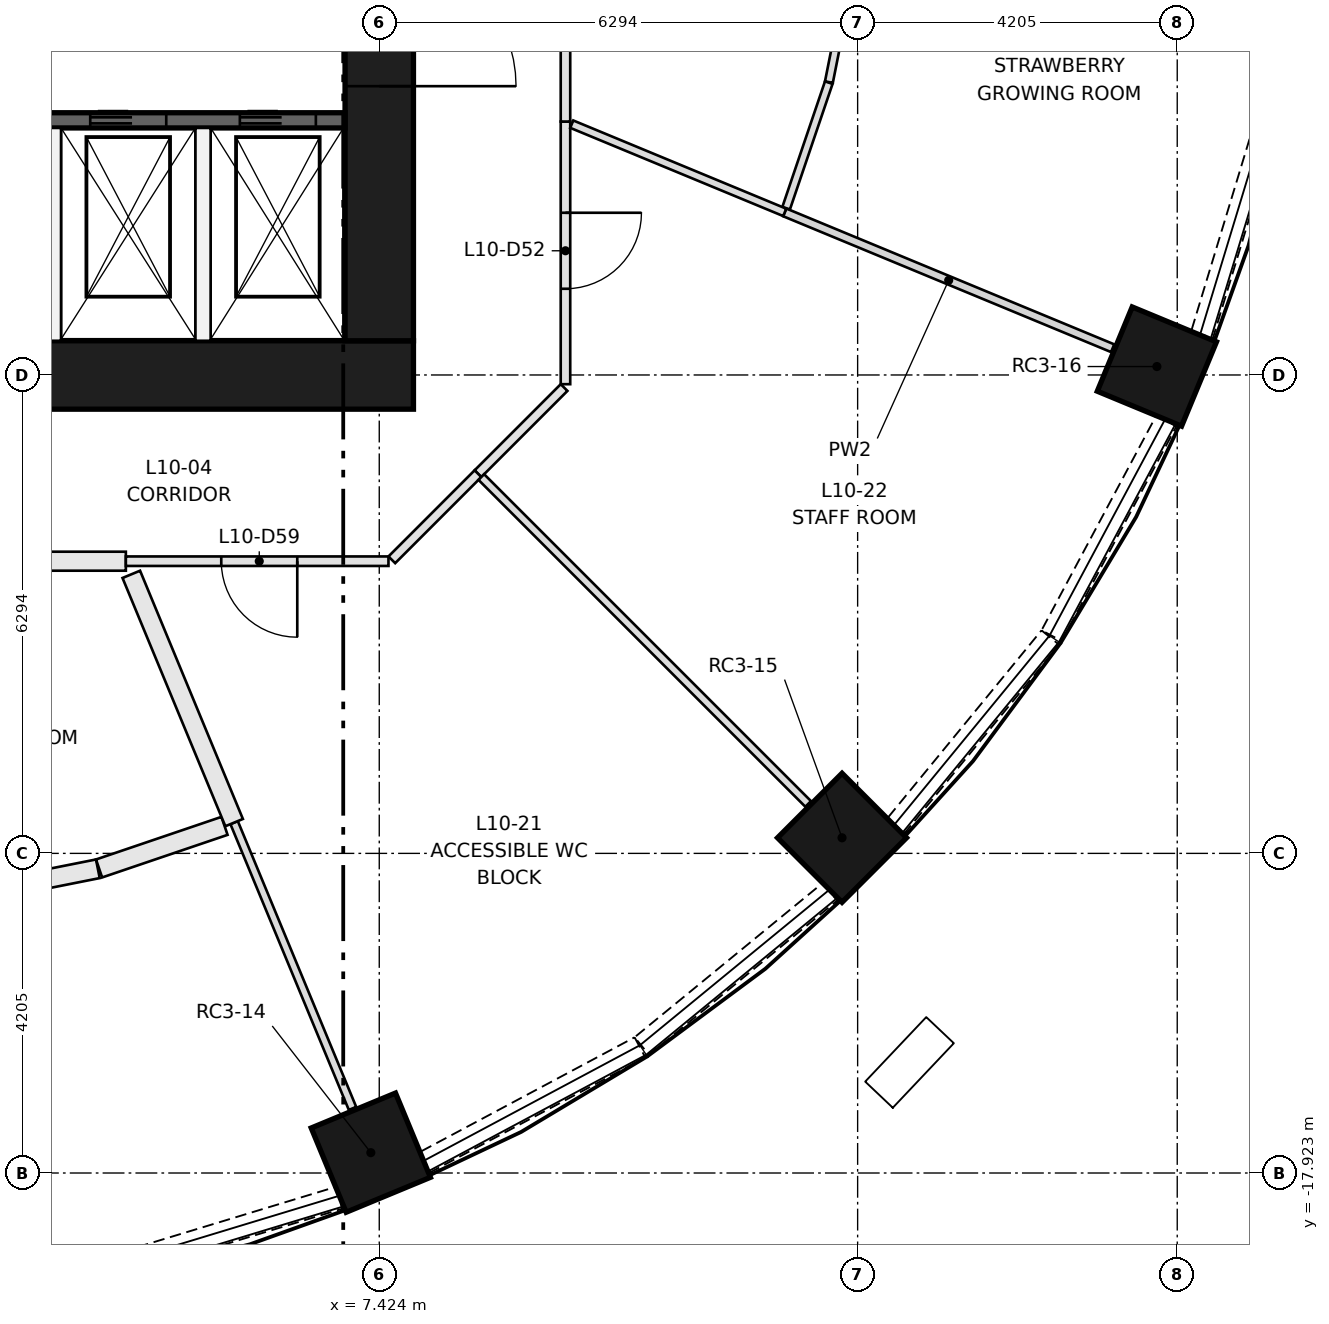
"""IFC4 building model, lengths in metres.
Left out: names, types, materials, properties, quantities, classifications, styles, units other than length and angle.
Written with IfcOpenShell. Run it as: python <this file> out.ifc"""

import sys

from ifc_helpers import new_model, si_unit, direction, frame, frame_2d, origin, origin_2d, place, context, subcontext, project, spatial, rectangle, extrude, element, fill, save


model = new_model("IFC4")
c1 = context("Model", 3, precision=1e-05, world=origin(), true_north=direction((0.0, 1.0)))
c2 = subcontext(c1, "Body", "Model", "MODEL_VIEW")
j1 = project(units=[si_unit("LENGTHUNIT", "METRE"), si_unit("PLANEANGLEUNIT", "RADIAN")], contexts=[c1])
p1 = place(None, origin())
s1 = spatial("IfcSite", under=j1, at=p1, CompositionType="ELEMENT")
p2 = place(p1, origin())
s2 = spatial("IfcBuilding", under=s1, at=p2, CompositionType="ELEMENT")
p3 = place(p2, frame((0.0, 0.0, 40.8)))
s3 = spatial("IfcBuildingStorey", under=s2, at=p3, CompositionType="ELEMENT", Elevation=40.8)
for number, where, z_axis, x_axis in (
    (1, (7.313, -17.655, 0.0), (0.0, 0.0, 1.0), (0.383, -0.924, 0.0)),
    (2, (13.513, -13.513, 0.0), (0.0, 0.0, 1.0), (0.707, -0.707, 0.0)),
    (3, (17.655, -7.313, 0.0), (0.0, 0.0, 1.0), (0.924, -0.383, 0.0)),
):
    element("IfcColumn", number, at=place(p3, frame(where, z_axis=z_axis, x_axis=x_axis)), inside=s3, PredefinedType="COLUMN", context=c2, shape_type="SweptSolid", body=[
        extrude(rectangle(XDim=1.2, YDim=1.2, at=origin_2d()), origin(), (0.0, 0.0, 1.0), 3.65),
    ])
p4 = place(p3, frame((-7.874, -7.424, 0.0), z_axis=(0.0, 0.0, 1.0), x_axis=(1.0, 0.0, 0.0)))
e4 = element("IfcWall", 4, at=p4, inside=s3, PredefinedType="SHEAR", context=c2, shape_type="SweptSolid", body=[
    extrude(rectangle(XDim=15.748, YDim=0.9, at=frame_2d((7.874, 0.0))), origin(), (0.0, 0.0, 1.0), 3.65),
])
p5 = place(p3, frame((7.424, -6.974, 0.0), z_axis=(0.0, 0.0, 1.0), x_axis=(0.0, 1.0, 0.0)))
e5 = element("IfcWall", 5, at=p5, inside=s3, PredefinedType="SHEAR", context=c2, shape_type="SweptSolid", body=[
    extrude(rectangle(XDim=13.948, YDim=0.9, at=frame_2d((6.974, 0.0))), origin(), (0.0, 0.0, 1.0), 3.65),
])
p6 = place(p5, frame((6.474, 0.0, 0.0)))
e6 = element("IfcOpeningElement", 6, at=p6, cuts=e5, PredefinedType="OPENING", context=c2, shape_type="SweptSolid", body=[
    extrude(rectangle(XDim=1.0, YDim=2.1, at=frame_2d((0.5, 1.05))), frame((0.0, 0.46, 0.0), z_axis=(0.0, -1.0, 0.0), x_axis=(1.0, 0.0, 0.0)), (0.0, 0.0, 1.0), 0.92),
])
p7 = place(p5, frame((3.35, 0.0, 0.0)))
e7 = element("IfcOpeningElement", 7, at=p7, cuts=e5, PredefinedType="OPENING", context=c2, shape_type="SweptSolid", body=[
    extrude(rectangle(XDim=1.8, YDim=2.1, at=frame_2d((0.9, 1.05))), frame((0.0, 0.46, 0.0), z_axis=(0.0, -1.0, 0.0), x_axis=(1.0, 0.0, 0.0)), (0.0, 0.0, 1.0), 0.92),
])
p8 = place(p5, frame((8.799, 0.0, 0.0)))
e8 = element("IfcOpeningElement", 8, at=p8, cuts=e5, PredefinedType="OPENING", context=c2, shape_type="SweptSolid", body=[
    extrude(rectangle(XDim=1.8, YDim=2.1, at=frame_2d((0.9, 1.05))), frame((0.0, 0.46, 0.0), z_axis=(0.0, -1.0, 0.0), x_axis=(1.0, 0.0, 0.0)), (0.0, 0.0, 1.0), 0.92),
])
p9 = place(p3, frame((-6.974, -4.074, 0.0), z_axis=(0.0, 0.0, 1.0), x_axis=(1.0, 0.0, 0.0)))
e9 = element("IfcWall", 9, at=p9, inside=s3, PredefinedType="SHEAR", context=c2, shape_type="SweptSolid", body=[
    extrude(rectangle(XDim=13.948, YDim=0.2, at=frame_2d((6.974, 0.0))), origin(), (0.0, 0.0, 1.0), 3.3),
])
p10 = place(p9, frame((0.918, 0.0, 0.0)))
e10 = element("IfcOpeningElement", 10, at=p10, cuts=e9, PredefinedType="OPENING", context=c2, shape_type="SweptSolid", body=[
    extrude(rectangle(XDim=1.1, YDim=2.1, at=frame_2d((0.55, 1.05))), frame((0.0, 0.11, 0.0), z_axis=(0.0, -1.0, 0.0), x_axis=(1.0, 0.0, 0.0)), (0.0, 0.0, 1.0), 0.22),
])
p11 = place(p9, frame((4.055, 0.0, 0.0)))
e11 = element("IfcOpeningElement", 11, at=p11, cuts=e9, PredefinedType="OPENING", context=c2, shape_type="SweptSolid", body=[
    extrude(rectangle(XDim=1.1, YDim=2.1, at=frame_2d((0.55, 1.05))), frame((0.0, 0.11, 0.0), z_axis=(0.0, -1.0, 0.0), x_axis=(1.0, 0.0, 0.0)), (0.0, 0.0, 1.0), 0.22),
])
p12 = place(p9, frame((6.658, 0.0, 0.0)))
e12 = element("IfcOpeningElement", 12, at=p12, cuts=e9, PredefinedType="OPENING", context=c2, shape_type="SweptSolid", body=[
    extrude(rectangle(XDim=1.0, YDim=2.1, at=frame_2d((0.5, 1.05))), frame((0.0, 0.11, 0.0), z_axis=(0.0, -1.0, 0.0), x_axis=(1.0, 0.0, 0.0)), (0.0, 0.0, 1.0), 0.22),
])
p13 = place(p9, frame((8.627, 0.0, 0.0)))
e13 = element("IfcOpeningElement", 13, at=p13, cuts=e9, PredefinedType="OPENING", context=c2, shape_type="SweptSolid", body=[
    extrude(rectangle(XDim=1.0, YDim=2.1, at=frame_2d((0.5, 1.05))), frame((0.0, 0.11, 0.0), z_axis=(0.0, -1.0, 0.0), x_axis=(1.0, 0.0, 0.0)), (0.0, 0.0, 1.0), 0.22),
])
p14 = place(p9, frame((10.595, 0.0, 0.0)))
e14 = element("IfcOpeningElement", 14, at=p14, cuts=e9, PredefinedType="OPENING", context=c2, shape_type="SweptSolid", body=[
    extrude(rectangle(XDim=1.0, YDim=2.1, at=frame_2d((0.5, 1.05))), frame((0.0, 0.11, 0.0), z_axis=(0.0, -1.0, 0.0), x_axis=(1.0, 0.0, 0.0)), (0.0, 0.0, 1.0), 0.22),
])
p15 = place(p9, frame((12.564, 0.0, 0.0)))
e15 = element("IfcOpeningElement", 15, at=p15, cuts=e9, PredefinedType="OPENING", context=c2, shape_type="SweptSolid", body=[
    extrude(rectangle(XDim=1.0, YDim=2.1, at=frame_2d((0.5, 1.05))), frame((0.0, 0.11, 0.0), z_axis=(0.0, -1.0, 0.0), x_axis=(1.0, 0.0, 0.0)), (0.0, 0.0, 1.0), 0.22),
])
for number, where, z_axis, x_axis in (
    (16, (3.137, -6.974, 0.0), (0.0, 0.0, 1.0), (0.0, 1.0, 0.0)),
    (17, (5.105, -6.974, 0.0), (0.0, 0.0, 1.0), (0.0, 1.0, 0.0)),
):
    element("IfcWall", number, at=place(p3, frame(where, z_axis=z_axis, x_axis=x_axis)), inside=s3, PredefinedType="PARTITIONING", context=c2, shape_type="SweptSolid", body=[
        extrude(rectangle(XDim=2.8, YDim=0.2, at=frame_2d((1.4, 0.0))), origin(), (0.0, 0.0, 1.0), 3.3),
    ])
p16 = place(p3, frame((3.83, -19.18, 0.0), z_axis=(0.0, 0.0, 1.0), x_axis=(0.956883225512, 0.290472877795, 0.0)))
e18 = element("IfcWall", 18, at=p16, inside=s3, PredefinedType="SOLIDWALL", context=c2, shape_type="SweptSolid", body=[
    extrude(rectangle(XDim=3.202, YDim=0.3, at=frame_2d((1.601, 0.0))), origin(), (0.0, 0.0, 1.0), 0.9),
])
p17 = place(p3, frame((8.028, -17.78, 0.0), z_axis=(0.0, 0.0, 1.0), x_axis=(0.881981372243, 0.471284265614, 0.0)))
e19 = element("IfcWall", 19, at=p17, inside=s3, PredefinedType="SOLIDWALL", context=c2, shape_type="SweptSolid", body=[
    extrude(rectangle(XDim=3.204, YDim=0.3, at=frame_2d((1.602, 0.0))), origin(), (0.0, 0.0, 1.0), 0.9),
])
for number, where, z_axis, x_axis in (
    (20, (10.879, -16.253, 0.0), (0.0, 0.0, 1.0), (0.773, 0.634, 0.0)),
    (21, (14.222, -13.354, 0.0), (0.0, 0.0, 1.0), (0.634, 0.773, 0.0)),
):
    element("IfcWall", number, at=place(p3, frame(where, z_axis=z_axis, x_axis=x_axis)), inside=s3, PredefinedType="SOLIDWALL", context=c2, shape_type="SweptSolid", body=[
        extrude(rectangle(XDim=3.202, YDim=0.3, at=frame_2d((1.601, 0.0))), origin(), (0.0, 0.0, 1.0), 0.9),
    ])
p18 = place(p3, frame((16.27, -10.854, 0.0), z_axis=(0.0, 0.0, 1.0), x_axis=(0.471284265614, 0.881981372243, 0.0)))
e22 = element("IfcWall", 22, at=p18, inside=s3, PredefinedType="SOLIDWALL", context=c2, shape_type="SweptSolid", body=[
    extrude(rectangle(XDim=3.204, YDim=0.3, at=frame_2d((1.602, 0.0))), origin(), (0.0, 0.0, 1.0), 0.9),
])
p19 = place(p3, frame((18.25, -6.895, 0.0), z_axis=(0.0, 0.0, 1.0), x_axis=(0.290472877795, 0.956883225512, 0.0)))
e23 = element("IfcWall", 23, at=p19, inside=s3, PredefinedType="SOLIDWALL", context=c2, shape_type="SweptSolid", body=[
    extrude(rectangle(XDim=3.202, YDim=0.3, at=frame_2d((1.601, 0.0))), origin(), (0.0, 0.0, 1.0), 0.9),
])
p20 = place(p3, frame((9.856, -7.589, 0.0), z_axis=(0.0, 0.0, 1.0), x_axis=(-0.70718294931, -0.707030604857, 0.0)))
e24 = element("IfcWall", 24, at=p20, inside=s3, PredefinedType="PARTITIONING", context=c2, shape_type="SweptSolid", body=[
    extrude(rectangle(XDim=1.603, YDim=0.125, at=frame_2d((0.801, 0.0))), origin(), (0.0, 0.0, 1.0), 3.3),
])
p21 = place(p3, frame((9.874, -4.09, 0.0), z_axis=(0.0, 0.0, 1.0), x_axis=(0.0, -1.0, 0.0)))
e25 = element("IfcWall", 25, at=p21, inside=s3, PredefinedType="PARTITIONING", context=c2, shape_type="SweptSolid", body=[
    extrude(rectangle(XDim=3.455, YDim=0.125, at=frame_2d((1.728, 0.0))), origin(), (0.0, 0.0, 1.0), 3.3),
])
p22 = place(p21, frame((1.2, 0.0, 0.0)))
e26 = element("IfcOpeningElement", 26, at=p22, cuts=e25, PredefinedType="OPENING", context=c2, shape_type="SweptSolid", body=[
    extrude(rectangle(XDim=1.0, YDim=2.1, at=frame_2d((0.5, 1.05))), frame((0.0, 0.073, 0.0), z_axis=(0.0, -1.0, 0.0), x_axis=(1.0, 0.0, 0.0)), (0.0, 0.0, 1.0), 0.145),
])
p23 = place(p3, frame((9.874, 0.0, 0.0), z_axis=(0.0, 0.0, 1.0), x_axis=(0.0, -1.0, 0.0)))
e27 = element("IfcWall", 27, at=p23, inside=s3, PredefinedType="PARTITIONING", context=c2, shape_type="SweptSolid", body=[
    extrude(rectangle(XDim=4.09, YDim=0.125, at=frame_2d((2.045, 0.0))), origin(), (0.0, 0.0, 1.0), 3.3),
])
p24 = place(p23, frame((1.5, 0.0, 0.0)))
e28 = element("IfcOpeningElement", 28, at=p24, cuts=e27, PredefinedType="OPENING", context=c2, shape_type="SweptSolid", body=[
    extrude(rectangle(XDim=1.0, YDim=2.1, at=frame_2d((0.5, 1.05))), frame((0.0, 0.073, 0.0), z_axis=(0.0, -1.0, 0.0), x_axis=(1.0, 0.0, 0.0)), (0.0, 0.0, 1.0), 0.145),
])
p25 = place(p3, frame((4.09, -9.874, 0.0), z_axis=(0.0, 0.0, 1.0), x_axis=(-1.0, 0.0, 0.0)))
e29 = element("IfcWall", 29, at=p25, inside=s3, PredefinedType="PARTITIONING", context=c2, shape_type="SweptSolid", body=[
    extrude(rectangle(XDim=3.965, YDim=0.25, at=frame_2d((1.982, 0.0))), origin(), (0.0, 0.0, 1.0), 3.3),
])
p26 = place(p3, frame((7.545, -9.874, 0.0), z_axis=(0.0, 0.0, 1.0), x_axis=(-1.0, 0.0, 0.0)))
e30 = element("IfcWall", 30, at=p26, inside=s3, PredefinedType="PARTITIONING", context=c2, shape_type="SweptSolid", body=[
    extrude(rectangle(XDim=3.455, YDim=0.125, at=frame_2d((1.728, 0.0))), origin(), (0.0, 0.0, 1.0), 3.3),
])
p27 = place(p26, frame((1.2, 0.0, 0.0)))
e31 = element("IfcOpeningElement", 31, at=p27, cuts=e30, PredefinedType="OPENING", context=c2, shape_type="SweptSolid", body=[
    extrude(rectangle(XDim=1.0, YDim=2.1, at=frame_2d((0.5, 1.05))), frame((0.0, 0.073, 0.0), z_axis=(0.0, -1.0, 0.0), x_axis=(1.0, 0.0, 0.0)), (0.0, 0.0, 1.0), 0.145),
])
p28 = place(p3, frame((8.722, -8.722, 0.0), z_axis=(0.0, 0.0, 1.0), x_axis=(-0.707030604857, -0.70718294931, 0.0)))
e32 = element("IfcWall", 32, at=p28, inside=s3, PredefinedType="PARTITIONING", context=c2, shape_type="SweptSolid", body=[
    extrude(rectangle(XDim=1.603, YDim=0.125, at=frame_2d((0.801, 0.0))), origin(), (0.0, 0.0, 1.0), 3.3),
])
p29 = place(p3, frame((17.073, -7.072, 0.0), z_axis=(0.0, 0.0, 1.0), x_axis=(-0.92387920118, 0.382684232268, 0.0)))
e33 = element("IfcWall", 33, at=p29, inside=s3, PredefinedType="PARTITIONING", context=c2, shape_type="SweptSolid", body=[
    extrude(rectangle(XDim=4.67, YDim=0.11, at=frame_2d((2.335, 0.0))), origin(), (0.0, 0.0, 1.0), 3.3),
])
p30 = place(p3, frame((12.778, -5.229, 0.0), z_axis=(0.0, 0.0, 1.0), x_axis=(0.321513757885, 0.946904907311, 0.0)))
e34 = element("IfcWall", 34, at=p30, inside=s3, PredefinedType="PARTITIONING", context=c2, shape_type="SweptSolid", body=[
    extrude(rectangle(XDim=1.744, YDim=0.105, at=frame_2d((0.872, 0.0))), origin(), (0.0, 0.0, 1.0), 3.3),
])
p31 = place(p3, frame((13.34, -3.571, 0.0), z_axis=(0.0, 0.0, 1.0), x_axis=(0.195098478373, 0.980783657968, 0.0)))
e35 = element("IfcWall", 35, at=p31, inside=s3, PredefinedType="PARTITIONING", context=c2, shape_type="SweptSolid", body=[
    extrude(rectangle(XDim=1.8, YDim=0.105, at=frame_2d((0.9, 0.0))), origin(), (0.0, 0.0, 1.0), 3.3),
])
p32 = place(p3, frame((1.889, -14.285, 0.0), z_axis=(0.0, 0.0, 1.0), x_axis=(0.980791158232, 0.195060769847, 0.0)))
e36 = element("IfcWall", 36, at=p32, inside=s3, PredefinedType="PARTITIONING", context=c2, shape_type="SweptSolid", body=[
    extrude(rectangle(XDim=1.869, YDim=0.25, at=frame_2d((0.934, 0.0))), origin(), (0.0, 0.0, 1.0), 3.3),
])
p33 = place(p3, frame((3.737, -13.917, 0.0), z_axis=(0.0, 0.0, 1.0), x_axis=(0.946889634804, 0.321558734138, 0.0)))
e37 = element("IfcWall", 37, at=p33, inside=s3, PredefinedType="PARTITIONING", context=c2, shape_type="SweptSolid", body=[
    extrude(rectangle(XDim=1.743, YDim=0.25, at=frame_2d((0.872, 0.0))), origin(), (0.0, 0.0, 1.0), 3.3),
])
p34 = place(p3, frame((5.514, -13.313, 0.0), z_axis=(0.0, 0.0, 1.0), x_axis=(0.382697907061, -0.923873536763, 0.0)))
e38 = element("IfcWall", 38, at=p34, inside=s3, PredefinedType="PARTITIONING", context=c2, shape_type="SweptSolid", body=[
    extrude(rectangle(XDim=4.07, YDim=0.105, at=frame_2d((2.035, 0.0))), origin(), (0.0, 0.0, 1.0), 3.3),
])
p35 = place(p3, frame((4.162, -10.047, 0.0), z_axis=(0.0, 0.0, 1.0), x_axis=(0.382662857696, -0.92388805455, 0.0)))
e39 = element("IfcWall", 39, at=p35, inside=s3, PredefinedType="PARTITIONING", context=c2, shape_type="SweptSolid", body=[
    extrude(rectangle(XDim=3.535, YDim=0.25, at=frame_2d((1.768, 0.0))), origin(), (0.0, 0.0, 1.0), 3.3),
])
p36 = place(p3, frame((8.767, -8.767, 0.0), z_axis=(0.0, 0.0, 1.0), x_axis=(0.707106781187, -0.707106781187, 0.0)))
e40 = element("IfcWall", 40, at=p36, inside=s3, PredefinedType="PARTITIONING", context=c2, shape_type="SweptSolid", body=[
    extrude(rectangle(XDim=6.082, YDim=0.105, at=frame_2d((3.041, 0.0))), origin(), (0.0, 0.0, 1.0), 3.3),
])
p37 = place(p3, frame((9.957, -4.124, 0.0), z_axis=(0.0, 0.0, 1.0), x_axis=(0.923860842545, -0.382728550819, 0.0)))
e41 = element("IfcWall", 41, at=p37, inside=s3, PredefinedType="PARTITIONING", context=c2, shape_type="SweptSolid", body=[
    extrude(rectangle(XDim=3.033, YDim=0.105, at=frame_2d((1.517, 0.0))), origin(), (0.0, 0.0, 1.0), 3.3),
])
p38 = place(p14, origin())
e42 = element("IfcDoor", 42, at=p38, inside=s3, OperationType="DOUBLE_DOOR_SLIDING", PredefinedType="DOOR", context=c2, shape_type="SweptSolid", body=[
    extrude(rectangle(XDim=1.0, YDim=2.1, at=frame_2d((0.5, 1.05))), frame((0.0, 0.025, 0.0), z_axis=(0.0, -1.0, 0.0), x_axis=(1.0, 0.0, 0.0)), (0.0, 0.0, 1.0), 0.05),
])
fill(e14, e42)
p39 = place(p15, origin())
e43 = element("IfcDoor", 43, at=p39, inside=s3, OperationType="DOUBLE_DOOR_SLIDING", PredefinedType="DOOR", context=c2, shape_type="SweptSolid", body=[
    extrude(rectangle(XDim=1.0, YDim=2.1, at=frame_2d((0.5, 1.05))), frame((0.0, 0.025, 0.0), z_axis=(0.0, -1.0, 0.0), x_axis=(1.0, 0.0, 0.0)), (0.0, 0.0, 1.0), 0.05),
])
fill(e15, e43)
p40 = place(p7, frame((1.8, 0.0, 0.0), z_axis=(0.0, 0.0, 1.0), x_axis=(-1.0, 0.0, 0.0)))
e44 = element("IfcDoor", 44, at=p40, inside=s3, OperationType="DOUBLE_DOOR_SINGLE_SWING", PredefinedType="DOOR", context=c2, shape_type="SweptSolid", body=[
    extrude(rectangle(XDim=1.8, YDim=2.1, at=frame_2d((0.9, 1.05))), frame((0.0, 0.025, 0.0), z_axis=(0.0, -1.0, 0.0), x_axis=(1.0, 0.0, 0.0)), (0.0, 0.0, 1.0), 0.05),
])
fill(e7, e44)
p41 = place(p22, origin())
e45 = element("IfcDoor", 45, at=p41, inside=s3, OperationType="SINGLE_SWING_LEFT", PredefinedType="DOOR", context=c2, shape_type="SweptSolid", body=[
    extrude(rectangle(XDim=1.0, YDim=2.1, at=frame_2d((0.5, 1.05))), frame((0.0, 0.025, 0.0), z_axis=(0.0, -1.0, 0.0), x_axis=(1.0, 0.0, 0.0)), (0.0, 0.0, 1.0), 0.05),
])
fill(e26, e45)
p42 = place(p27, origin())
e46 = element("IfcDoor", 46, at=p42, inside=s3, OperationType="SINGLE_SWING_LEFT", PredefinedType="DOOR", context=c2, shape_type="SweptSolid", body=[
    extrude(rectangle(XDim=1.0, YDim=2.1, at=frame_2d((0.5, 1.05))), frame((0.0, 0.025, 0.0), z_axis=(0.0, -1.0, 0.0), x_axis=(1.0, 0.0, 0.0)), (0.0, 0.0, 1.0), 0.05),
])
fill(e31, e46)
save(model, sys.argv[1])
